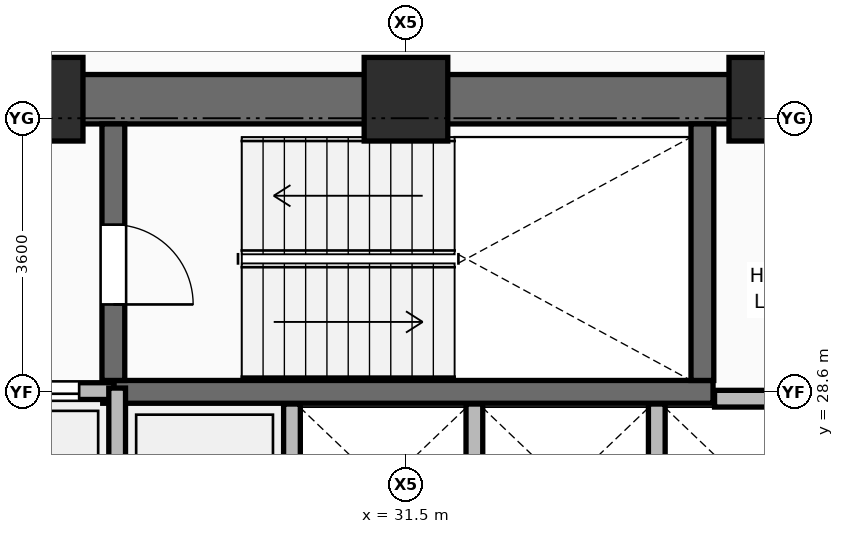
"""IFC4 building model, lengths in metres.
Left out: names, types, materials, properties, quantities, classifications, styles, units other than length and angle.
Written with IfcOpenShell. Run it as: python <this file> out.ifc"""

import sys

from ifc_helpers import new_model, si_unit, direction, frame, frame_2d, origin, origin_2d, place, context, subcontext, project, spatial, rectangle, extrude, element, fill, save


model = new_model("IFC4")
c1 = context("Model", 3, precision=1e-05, world=origin(), true_north=direction((0.0, 1.0)))
c2 = subcontext(c1, "Body", "Model", "MODEL_VIEW")
j1 = project(units=[si_unit("LENGTHUNIT", "METRE"), si_unit("PLANEANGLEUNIT", "RADIAN")], contexts=[c1])
p1 = place(None, origin())
s1 = spatial("IfcSite", under=j1, at=p1, CompositionType="ELEMENT")
p2 = place(p1, origin())
s2 = spatial("IfcBuilding", under=s1, at=p2, CompositionType="ELEMENT")
p3 = place(p2, frame((0.0, 0.0, 64.5)))
s3 = spatial("IfcBuildingStorey", under=s2, at=p3, CompositionType="ELEMENT", Elevation=64.5)
for number, where, z_axis, x_axis in (
    (1, (26.7, 32.45, 0.0), (0.0, 0.0, 1.0), (1.0, 0.0, 0.0)),
    (2, (31.5, 32.45, 0.0), (0.0, 0.0, 1.0), (1.0, 0.0, 0.0)),
    (3, (36.3, 32.45, 0.0), (0.0, 0.0, 1.0), (1.0, 0.0, 0.0)),
):
    element("IfcColumn", number, at=place(p3, frame(where, z_axis=z_axis, x_axis=x_axis)), inside=s3, PredefinedType="COLUMN", context=c2, shape_type="SweptSolid", body=[
        extrude(rectangle(XDim=1.1, YDim=1.1, at=origin_2d()), origin(), (0.0, 0.0, 1.0), 3.75),
    ])
p4 = place(p3, frame((30.0, 25.71, 0.0), z_axis=(0.0, 0.0, 1.0), x_axis=(0.0, 1.0, 0.0)))
e4 = element("IfcWall", 4, at=p4, inside=s3, PredefinedType="PARTITIONING", context=c2, shape_type="SweptSolid", body=[
    extrude(rectangle(XDim=2.73, YDim=0.22, at=frame_2d((1.365, 0.0))), origin(), (0.0, 0.0, 1.0), 3.545),
])
p5 = place(p3, frame((32.4, 26.2, 0.0), z_axis=(0.0, 0.0, 1.0), x_axis=(0.0, 1.0, 0.0)))
e5 = element("IfcWall", 5, at=p5, inside=s3, PredefinedType="PARTITIONING", context=c2, shape_type="SweptSolid", body=[
    extrude(rectangle(XDim=2.24, YDim=0.22, at=frame_2d((1.12, 0.0))), origin(), (0.0, 0.0, 1.0), 3.545),
])
p6 = place(p3, frame((34.8, 26.23, 0.0), z_axis=(0.0, 0.0, 1.0), x_axis=(0.0, 1.0, 0.0)))
e6 = element("IfcWall", 6, at=p6, inside=s3, PredefinedType="PARTITIONING", context=c2, shape_type="SweptSolid", body=[
    extrude(rectangle(XDim=2.21, YDim=0.22, at=frame_2d((1.105, 0.0))), origin(), (0.0, 0.0, 1.0), 3.545),
])
p7 = place(p3, frame((21.575, 32.45, 0.0), z_axis=(0.0, 0.0, 1.0), x_axis=(1.0, 0.0, 0.0)))
e7 = element("IfcWall", 7, at=p7, inside=s3, PredefinedType="SHEAR", context=c2, shape_type="SweptSolid", body=[
    extrude(rectangle(XDim=19.85, YDim=0.65, at=frame_2d((9.925, 0.0))), origin(), (0.0, 0.0, 1.0), 3.57),
])
p8 = place(p7, frame((2.175, 0.0, 0.0)))
e8 = element("IfcOpeningElement", 8, at=p8, cuts=e7, PredefinedType="OPENING", context=c2, shape_type="SweptSolid", body=[
    extrude(rectangle(XDim=1.1, YDim=2.1, at=frame_2d((0.55, 1.05))), frame((0.0, 0.335, 0.0), z_axis=(0.0, -1.0, 0.0), x_axis=(1.0, 0.0, 0.0)), (0.0, 0.0, 1.0), 0.67),
])
p9 = place(p7, frame((15.565, 0.0, 0.0)))
e9 = element("IfcOpeningElement", 9, at=p9, cuts=e7, PredefinedType="OPENING", context=c2, shape_type="SweptSolid", body=[
    extrude(rectangle(XDim=1.0, YDim=2.1, at=frame_2d((0.5, 1.05))), frame((0.0, 0.335, 0.0), z_axis=(0.0, -1.0, 0.0), x_axis=(1.0, 0.0, 0.0)), (0.0, 0.0, 1.0), 0.67),
])
p10 = place(p7, frame((17.575, 0.0, 0.0)))
e10 = element("IfcOpeningElement", 10, at=p10, cuts=e7, PredefinedType="OPENING", context=c2, shape_type="SweptSolid", body=[
    extrude(rectangle(XDim=0.9, YDim=2.1, at=frame_2d((0.45, 1.05))), frame((0.0, 0.335, 0.0), z_axis=(0.0, -1.0, 0.0), x_axis=(1.0, 0.0, 0.0)), (0.0, 0.0, 1.0), 0.67),
])
p11 = place(p3, frame((27.51, 28.6, 0.0), z_axis=(0.0, 0.0, 1.0), x_axis=(1.0, 0.0, 0.0)))
e11 = element("IfcWall", 11, at=p11, inside=s3, PredefinedType="SHEAR", context=c2, shape_type="SweptSolid", body=[
    extrude(rectangle(XDim=8.03, YDim=0.3, at=frame_2d((4.015, 0.0))), origin(), (0.0, 0.0, 1.0), 3.57),
])
p12 = place(p3, frame((27.65, 28.75, 0.0), z_axis=(0.0, 0.0, 1.0), x_axis=(0.0, 1.0, 0.0)))
e12 = element("IfcWall", 12, at=p12, inside=s3, PredefinedType="SHEAR", context=c2, shape_type="SweptSolid", body=[
    extrude(rectangle(XDim=3.375, YDim=0.3, at=frame_2d((1.688, 0.0))), origin(), (0.0, 0.0, 1.0), 3.57),
])
p13 = place(p12, frame((1.0, 0.0, 0.0)))
e13 = element("IfcOpeningElement", 13, at=p13, cuts=e12, PredefinedType="OPENING", context=c2, shape_type="SweptSolid", body=[
    extrude(rectangle(XDim=1.05, YDim=2.1, at=frame_2d((0.525, 1.05))), frame((0.0, 0.16, 0.0), z_axis=(0.0, -1.0, 0.0), x_axis=(1.0, 0.0, 0.0)), (0.0, 0.0, 1.0), 0.32),
])
p14 = place(p3, frame((35.4, 28.75, 0.0), z_axis=(0.0, 0.0, 1.0), x_axis=(0.0, 1.0, 0.0)))
e14 = element("IfcWall", 14, at=p14, inside=s3, PredefinedType="SHEAR", context=c2, shape_type="SweptSolid", body=[
    extrude(rectangle(XDim=3.375, YDim=0.3, at=frame_2d((1.688, 0.0))), origin(), (0.0, 0.0, 1.0), 3.57),
])
p15 = place(p3, frame((25.64, 28.61, 0.0), z_axis=(0.0, 0.0, 1.0), x_axis=(1.0, 0.0, 0.0)))
e15 = element("IfcWall", 15, at=p15, inside=s3, PredefinedType="PARTITIONING", context=c2, shape_type="SweptSolid", body=[
    extrude(rectangle(XDim=2.02, YDim=0.22, at=frame_2d((1.01, 0.0))), origin(), (0.0, 0.0, 1.0), 3.55),
])
p16 = place(p15, frame((0.46, 0.0, 0.0)))
e16 = element("IfcOpeningElement", 16, at=p16, cuts=e15, PredefinedType="OPENING", context=c2, shape_type="SweptSolid", body=[
    extrude(rectangle(XDim=1.1, YDim=2.2, at=frame_2d((0.55, 1.1))), frame((0.0, 0.12, 0.0), z_axis=(0.0, -1.0, 0.0), x_axis=(1.0, 0.0, 0.0)), (0.0, 0.0, 1.0), 0.24),
])
p17 = place(p3, frame((35.56, 28.51, 0.0), z_axis=(0.0, 0.0, 1.0), x_axis=(1.0, 0.0, 0.0)))
e17 = element("IfcWall", 17, at=p17, inside=s3, PredefinedType="PARTITIONING", context=c2, shape_type="SweptSolid", body=[
    extrude(rectangle(XDim=1.6, YDim=0.22, at=frame_2d((0.8, 0.0))), origin(), (0.0, 0.0, 1.0), 3.55),
])
p18 = place(p3, frame((27.7, 25.65, 0.0), z_axis=(0.0, 0.0, 1.0), x_axis=(0.0, 1.0, 0.0)))
e18 = element("IfcWall", 18, at=p18, inside=s3, PredefinedType="PARTITIONING", context=c2, shape_type="SweptSolid", body=[
    extrude(rectangle(XDim=3.0, YDim=0.22, at=frame_2d((1.5, 0.0))), origin(), (0.0, 0.0, 1.0), 3.55),
])
p19 = place(p13, frame((1.05, 0.0, 0.0), z_axis=(0.0, 0.0, 1.0), x_axis=(-1.0, 0.0, 0.0)))
e19 = element("IfcDoor", 19, at=p19, inside=s3, OperationType="SINGLE_SWING_RIGHT", PredefinedType="DOOR", context=c2, shape_type="SweptSolid", body=[
    extrude(rectangle(XDim=1.05, YDim=2.1, at=frame_2d((0.525, 1.05))), frame((0.0, 0.025, 0.0), z_axis=(0.0, -1.0, 0.0), x_axis=(1.0, 0.0, 0.0)), (0.0, 0.0, 1.0), 0.05),
])
fill(e13, e19)
p20 = place(p16, origin())
e20 = element("IfcDoor", 20, at=p20, inside=s3, OperationType="DOUBLE_DOOR_SLIDING", PredefinedType="DOOR", context=c2, shape_type="SweptSolid", body=[
    extrude(rectangle(XDim=1.1, YDim=2.2, at=frame_2d((0.55, 1.1))), frame((0.0, 0.025, 0.0), z_axis=(0.0, -1.0, 0.0), x_axis=(1.0, 0.0, 0.0)), (0.0, 0.0, 1.0), 0.05),
])
fill(e16, e20)
save(model, sys.argv[1])
